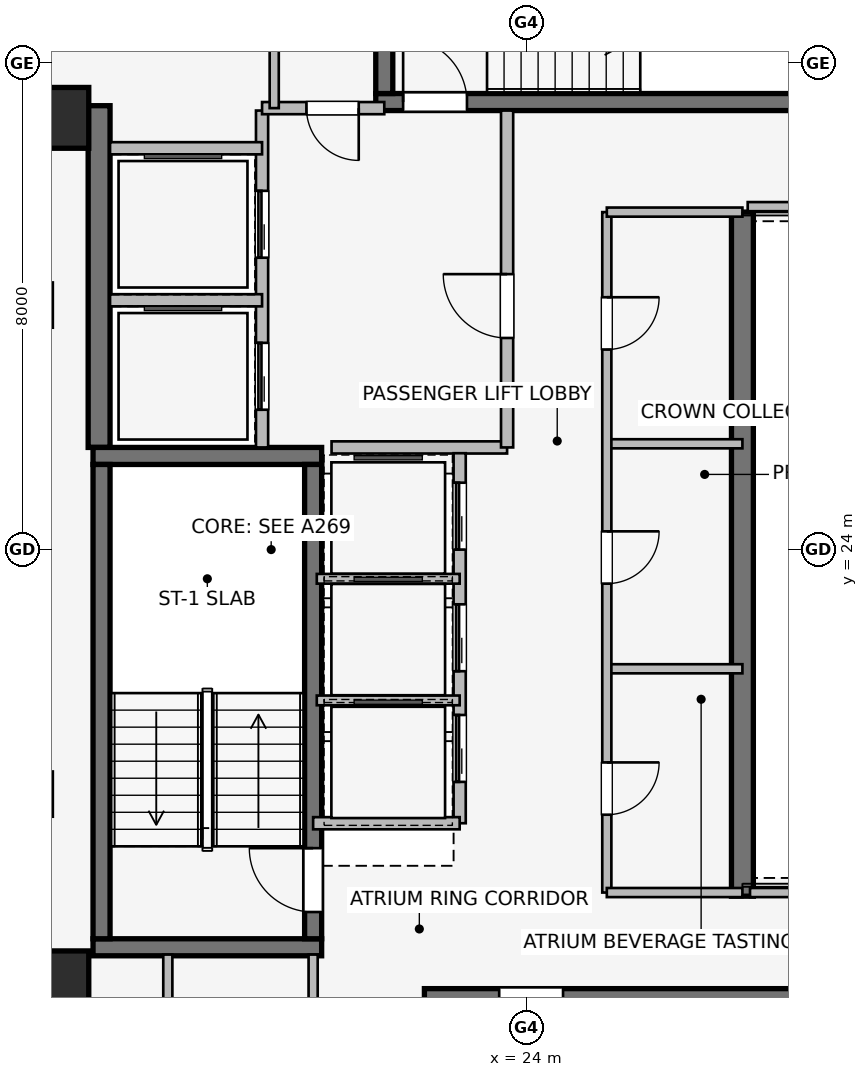
"""IFC4 building model, lengths in metres.
Left out: names, types, materials, properties, quantities, classifications, styles, units other than length and angle.
Written with IfcOpenShell. Run it as: python <this file> out.ifc"""

import sys

from ifc_helpers import new_model, si_unit, direction, frame, frame_2d, origin, origin_2d, place, context, subcontext, project, spatial, rectangle, extrude, element, fill, save


model = new_model("IFC4")
c1 = context("Model", 3, precision=1e-05, world=origin(), true_north=direction((0.0, 1.0)))
c2 = subcontext(c1, "Body", "Model", "MODEL_VIEW")
j1 = project(units=[si_unit("LENGTHUNIT", "METRE"), si_unit("PLANEANGLEUNIT", "RADIAN")], contexts=[c1])
p1 = place(None, origin())
s1 = spatial("IfcSite", under=j1, at=p1, CompositionType="ELEMENT")
p2 = place(p1, origin())
s2 = spatial("IfcBuilding", under=s1, at=p2, CompositionType="ELEMENT")
p3 = place(p2, frame((0.0, 0.0, 245.45)))
s3 = spatial("IfcBuildingStorey", under=s2, at=p3, CompositionType="ELEMENT", Elevation=245.45)
p4 = place(p3, frame((16.97, 25.68, 0.0), z_axis=(0.0, 0.0, 1.0), x_axis=(0.0, 1.0, 0.0)))
e1 = element("IfcWall", 1, at=p4, inside=s3, PredefinedType="SHEAR", context=c2, shape_type="SweptSolid", body=[
    extrude(rectangle(XDim=5.62, YDim=0.36, at=frame_2d((2.81, 0.0))), origin(), (0.0, 0.0, 1.0), 3.55),
])
p5 = place(p3, frame((27.55, 29.55, 0.0), z_axis=(0.0, 0.0, 1.0), x_axis=(0.0, -1.0, 0.0)))
e2 = element("IfcWall", 2, at=p5, inside=s3, PredefinedType="SHEAR", context=c2, shape_type="SweptSolid", body=[
    extrude(rectangle(XDim=11.25, YDim=0.36, at=frame_2d((5.625, 0.0))), origin(), (0.0, 0.0, 1.0), 3.55),
])
for number, where, z_axis, x_axis in (
    (3, (16.87, 17.46, 0.0), (0.0, 0.0, 1.0), (1.0, 0.0, 0.0)),
    (4, (20.63, 25.54, 0.0), (0.0, 0.0, 1.0), (-1.0, 0.0, 0.0)),
):
    element("IfcWall", number, at=place(p3, frame(where, z_axis=z_axis, x_axis=x_axis)), inside=s3, PredefinedType="SHEAR", context=c2, shape_type="SweptSolid", body=[
        extrude(rectangle(XDim=3.76, YDim=0.28, at=frame_2d((1.88, 0.0))), origin(), (0.0, 0.0, 1.0), 3.55),
    ])
p6 = place(p3, frame((17.01, 25.4, 0.0), z_axis=(0.0, 0.0, 1.0), x_axis=(0.0, -1.0, 0.0)))
e5 = element("IfcWall", 5, at=p6, inside=s3, PredefinedType="SHEAR", context=c2, shape_type="SweptSolid", body=[
    extrude(rectangle(XDim=7.8, YDim=0.28, at=frame_2d((3.9, 0.0))), origin(), (0.0, 0.0, 1.0), 3.55),
])
p7 = place(p3, frame((20.49, 17.6, 0.0), z_axis=(0.0, 0.0, 1.0), x_axis=(0.0, 1.0, 0.0)))
e6 = element("IfcWall", 6, at=p7, inside=s3, PredefinedType="SHEAR", context=c2, shape_type="SweptSolid", body=[
    extrude(rectangle(XDim=7.8, YDim=0.28, at=frame_2d((3.9, 0.0))), origin(), (0.0, 0.0, 1.0), 3.55),
])
p8 = place(p7, frame((0.44, 0.0, 0.0)))
e7 = element("IfcOpeningElement", 7, at=p8, cuts=e6, PredefinedType="OPENING", context=c2, shape_type="SweptSolid", body=[
    extrude(rectangle(XDim=1.05, YDim=2.0, at=frame_2d((0.525, 1.0))), frame((0.0, 0.15, 0.0), z_axis=(0.0, -1.0, 0.0), x_axis=(1.0, 0.0, 0.0)), (0.0, 0.0, 1.0), 0.3),
])
p9 = place(p3, frame((30.68, 16.64, 0.0), z_axis=(0.0, 0.0, 1.0), x_axis=(-1.0, 0.0, 0.0)))
e8 = element("IfcWall", 8, at=p9, inside=s3, PredefinedType="SHEAR", context=c2, shape_type="SweptSolid", body=[
    extrude(rectangle(XDim=8.36, YDim=0.28, at=frame_2d((4.18, 0.0))), origin(), (0.0, 0.0, 1.0), 3.55),
])
p10 = place(p9, frame((6.08, 0.0, 0.0)))
e9 = element("IfcOpeningElement", 9, at=p10, cuts=e8, PredefinedType="OPENING", context=c2, shape_type="SweptSolid", body=[
    extrude(rectangle(XDim=1.05, YDim=2.0, at=frame_2d((0.525, 1.0))), frame((0.0, 0.15, 0.0), z_axis=(0.0, -1.0, 0.0), x_axis=(1.0, 0.0, 0.0)), (0.0, 0.0, 1.0), 0.3),
])
p11 = place(p3, frame((21.52, 31.36, 0.0), z_axis=(0.0, 0.0, 1.0), x_axis=(1.0, 0.0, 0.0)))
e10 = element("IfcWall", 10, at=p11, inside=s3, PredefinedType="SHEAR", context=c2, shape_type="SweptSolid", body=[
    extrude(rectangle(XDim=8.36, YDim=0.28, at=frame_2d((4.18, 0.0))), origin(), (0.0, 0.0, 1.0), 3.55),
])
p12 = place(p11, frame((0.45, 0.0, 0.0)))
e11 = element("IfcOpeningElement", 11, at=p12, cuts=e10, PredefinedType="OPENING", context=c2, shape_type="SweptSolid", body=[
    extrude(rectangle(XDim=1.05, YDim=2.0, at=frame_2d((0.525, 1.0))), frame((0.0, 0.15, 0.0), z_axis=(0.0, -1.0, 0.0), x_axis=(1.0, 0.0, 0.0)), (0.0, 0.0, 1.0), 0.3),
])
p13 = place(p3, frame((21.66, 34.7, 0.0), z_axis=(0.0, 0.0, 1.0), x_axis=(0.0, -1.0, 0.0)))
e12 = element("IfcWall", 12, at=p13, inside=s3, PredefinedType="SHEAR", context=c2, shape_type="SweptSolid", body=[
    extrude(rectangle(XDim=3.2, YDim=0.28, at=frame_2d((1.6, 0.0))), origin(), (0.0, 0.0, 1.0), 3.55),
])
for number, where, z_axis, x_axis in (
    (13, (16.3, 16.9, 0.0), (0.0, 0.0, 1.0), (1.0, 0.0, 0.0)),
    (14, (16.3, 31.1, 0.0), (0.0, 0.0, 1.0), (1.0, 0.0, 0.0)),
):
    element("IfcColumn", number, at=place(p3, frame(where, z_axis=z_axis, x_axis=x_axis)), inside=s3, PredefinedType="COLUMN", context=c2, shape_type="SweptSolid", body=[
        extrude(rectangle(XDim=1.0, YDim=1.0, at=origin_2d()), origin(), (0.0, 0.0, 1.0), 3.55),
    ])
p14 = place(p3, frame((15.574, 32.082, 0.0), z_axis=(0.0, 0.0, 1.0), x_axis=(0.520325409202, 0.853968072318, 0.0)))
e15 = element("IfcWall", 15, at=p14, inside=s3, PredefinedType="STANDARD", context=c2, shape_type="SweptSolid", body=[
    extrude(rectangle(XDim=1.678, YDim=0.33, at=frame_2d((0.839, 0.0))), origin(), (0.0, 0.0, 1.0), 3.29),
])
p15 = place(p3, frame((19.65, 25.68, 0.0), z_axis=(0.0, 0.0, 1.0), x_axis=(0.0, 1.0, 0.0)))
e16 = element("IfcWall", 16, at=p15, inside=s3, PredefinedType="PARTITIONING", context=c2, shape_type="SweptSolid", body=[
    extrude(rectangle(XDim=5.54, YDim=0.2, at=frame_2d((2.77, 0.0))), origin(), (0.0, 0.0, 1.0), 3.29),
])
p16 = place(p15, frame((0.62, 0.0, 0.0)))
e17 = element("IfcOpeningElement", 17, at=p16, cuts=e16, PredefinedType="OPENING", context=c2, shape_type="SweptSolid", body=[
    extrude(rectangle(XDim=1.1, YDim=2.2, at=frame_2d((0.55, 1.1))), frame((0.0, 0.11, 0.0), z_axis=(0.0, -1.0, 0.0), x_axis=(1.0, 0.0, 0.0)), (0.0, 0.0, 1.0), 0.22),
])
p17 = place(p15, frame((3.12, 0.0, 0.0)))
e18 = element("IfcOpeningElement", 18, at=p17, cuts=e16, PredefinedType="OPENING", context=c2, shape_type="SweptSolid", body=[
    extrude(rectangle(XDim=1.1, YDim=2.2, at=frame_2d((0.55, 1.1))), frame((0.0, 0.11, 0.0), z_axis=(0.0, -1.0, 0.0), x_axis=(1.0, 0.0, 0.0)), (0.0, 0.0, 1.0), 0.22),
])
p18 = place(p3, frame((20.793, 25.68, 0.0), z_axis=(0.0, 0.0, 1.0), x_axis=(1.0, 0.0, 0.0)))
e19 = element("IfcWall", 19, at=p18, inside=s3, PredefinedType="PARTITIONING", context=c2, shape_type="SweptSolid", body=[
    extrude(rectangle(XDim=2.887, YDim=0.2, at=frame_2d((1.443, 0.0))), origin(), (0.0, 0.0, 1.0), 3.29),
])
p19 = place(p3, frame((23.68, 25.68, 0.0), z_axis=(0.0, 0.0, 1.0), x_axis=(0.0, 1.0, 0.0)))
e20 = element("IfcWall", 20, at=p19, inside=s3, PredefinedType="PARTITIONING", context=c2, shape_type="SweptSolid", body=[
    extrude(rectangle(XDim=5.54, YDim=0.2, at=frame_2d((2.77, 0.0))), origin(), (0.0, 0.0, 1.0), 3.29),
])
p20 = place(p19, frame((1.8, 0.0, 0.0)))
e21 = element("IfcOpeningElement", 21, at=p20, cuts=e20, PredefinedType="OPENING", context=c2, shape_type="SweptSolid", body=[
    extrude(rectangle(XDim=1.05, YDim=2.0, at=frame_2d((0.525, 1.0))), frame((0.0, 0.11, 0.0), z_axis=(0.0, -1.0, 0.0), x_axis=(1.0, 0.0, 0.0)), (0.0, 0.0, 1.0), 0.22),
])
p21 = place(p3, frame((21.66, 31.26, 0.0), z_axis=(0.0, 0.0, 1.0), x_axis=(-1.0, 0.0, 0.0)))
e22 = element("IfcWall", 22, at=p21, inside=s3, PredefinedType="PARTITIONING", context=c2, shape_type="SweptSolid", body=[
    extrude(rectangle(XDim=2.01, YDim=0.2, at=frame_2d((1.005, 0.0))), origin(), (0.0, 0.0, 1.0), 3.29),
])
p22 = place(p21, frame((0.42, 0.0, 0.0)))
e23 = element("IfcOpeningElement", 23, at=p22, cuts=e22, PredefinedType="OPENING", context=c2, shape_type="SweptSolid", body=[
    extrude(rectangle(XDim=0.86, YDim=2.0, at=frame_2d((0.43, 1.0))), frame((0.0, 0.11, 0.0), z_axis=(0.0, -1.0, 0.0), x_axis=(1.0, 0.0, 0.0)), (0.0, 0.0, 1.0), 0.22),
])
p23 = place(p3, frame((17.15, 28.1, 0.0), z_axis=(0.0, 0.0, 1.0), x_axis=(1.0, 0.0, 0.0)))
e24 = element("IfcWall", 24, at=p23, inside=s3, PredefinedType="PARTITIONING", context=c2, shape_type="SweptSolid", body=[
    extrude(rectangle(XDim=2.5, YDim=0.2, at=frame_2d((1.25, 0.0))), origin(), (0.0, 0.0, 1.0), 3.29),
])
p24 = place(p3, frame((19.65, 30.6, 0.0), z_axis=(0.0, 0.0, 1.0), x_axis=(-1.0, 0.0, 0.0)))
e25 = element("IfcWall", 25, at=p24, inside=s3, PredefinedType="PARTITIONING", context=c2, shape_type="SweptSolid", body=[
    extrude(rectangle(XDim=2.5, YDim=0.2, at=frame_2d((1.25, 0.0))), origin(), (0.0, 0.0, 1.0), 2.19),
])
p25 = place(p3, frame((22.9, 19.5, 0.0), z_axis=(0.0, 0.0, 1.0), x_axis=(0.0, 1.0, 0.0)))
e26 = element("IfcWall", 26, at=p25, inside=s3, PredefinedType="PARTITIONING", context=c2, shape_type="SweptSolid", body=[
    extrude(rectangle(XDim=6.085, YDim=0.2, at=frame_2d((3.042, 0.0))), origin(), (0.0, 0.0, 1.0), 3.29),
])
p26 = place(p25, frame((0.68, 0.0, 0.0)))
e27 = element("IfcOpeningElement", 27, at=p26, cuts=e26, PredefinedType="OPENING", context=c2, shape_type="SweptSolid", body=[
    extrude(rectangle(XDim=1.1, YDim=2.2, at=frame_2d((0.55, 1.1))), frame((0.0, 0.11, 0.0), z_axis=(0.0, -1.0, 0.0), x_axis=(1.0, 0.0, 0.0)), (0.0, 0.0, 1.0), 0.22),
])
p27 = place(p25, frame((2.5, 0.0, 0.0)))
e28 = element("IfcOpeningElement", 28, at=p27, cuts=e26, PredefinedType="OPENING", context=c2, shape_type="SweptSolid", body=[
    extrude(rectangle(XDim=1.1, YDim=2.2, at=frame_2d((0.55, 1.1))), frame((0.0, 0.11, 0.0), z_axis=(0.0, -1.0, 0.0), x_axis=(1.0, 0.0, 0.0)), (0.0, 0.0, 1.0), 0.22),
])
p28 = place(p25, frame((4.5, 0.0, 0.0)))
e29 = element("IfcOpeningElement", 29, at=p28, cuts=e26, PredefinedType="OPENING", context=c2, shape_type="SweptSolid", body=[
    extrude(rectangle(XDim=1.1, YDim=2.2, at=frame_2d((0.55, 1.1))), frame((0.0, 0.11, 0.0), z_axis=(0.0, -1.0, 0.0), x_axis=(1.0, 0.0, 0.0)), (0.0, 0.0, 1.0), 0.22),
])
p29 = place(p3, frame((20.49, 19.5, 0.0), z_axis=(0.0, 0.0, 1.0), x_axis=(1.0, 0.0, 0.0)))
e30 = element("IfcWall", 30, at=p29, inside=s3, PredefinedType="PARTITIONING", context=c2, shape_type="SweptSolid", body=[
    extrude(rectangle(XDim=2.41, YDim=0.2, at=frame_2d((1.205, 0.0))), origin(), (0.0, 0.0, 1.0), 2.19),
])
for number, where, z_axis, x_axis in (
    (31, (20.55, 21.52, 0.0), (0.0, 0.0, 1.0), (1.0, 0.0, 0.0)),
    (32, (20.55, 23.52, 0.0), (0.0, 0.0, 1.0), (1.0, 0.0, 0.0)),
):
    element("IfcWall", number, at=place(p3, frame(where, z_axis=z_axis, x_axis=x_axis)), inside=s3, PredefinedType="PARTITIONING", context=c2, shape_type="SweptSolid", body=[
        extrude(rectangle(XDim=2.35, YDim=0.16, at=frame_2d((1.175, 0.0))), origin(), (0.0, 0.0, 1.0), 3.29),
    ])
for number, where, z_axis, x_axis in (
    (33, (25.32, 22.04, 0.0), (0.0, 0.0, 1.0), (1.0, 0.0, 0.0)),
    (34, (25.32, 25.74, 0.0), (0.0, 0.0, 1.0), (1.0, 0.0, 0.0)),
):
    element("IfcWall", number, at=place(p3, frame(where, z_axis=z_axis, x_axis=x_axis)), inside=s3, PredefinedType="PARTITIONING", context=c2, shape_type="SweptSolid", body=[
        extrude(rectangle(XDim=2.23, YDim=0.15, at=frame_2d((1.115, 0.0))), origin(), (0.0, 0.0, 1.0), 3.29),
    ])
p30 = place(p3, frame((25.32, 29.55, 0.0), z_axis=(0.0, 0.0, 1.0), x_axis=(0.0, -1.0, 0.0)))
e35 = element("IfcWall", 35, at=p30, inside=s3, PredefinedType="PARTITIONING", context=c2, shape_type="SweptSolid", body=[
    extrude(rectangle(XDim=11.19, YDim=0.15, at=frame_2d((5.595, 0.0))), origin(), (0.0, 0.0, 1.0), 3.29),
])
p31 = place(p30, frame((1.4, 0.0, 0.0)))
e36 = element("IfcOpeningElement", 36, at=p31, cuts=e35, PredefinedType="OPENING", context=c2, shape_type="SweptSolid", body=[
    extrude(rectangle(XDim=0.86, YDim=2.0, at=frame_2d((0.43, 1.0))), frame((0.0, 0.085, 0.0), z_axis=(0.0, -1.0, 0.0), x_axis=(1.0, 0.0, 0.0)), (0.0, 0.0, 1.0), 0.17),
])
p32 = place(p30, frame((5.25, 0.0, 0.0)))
e37 = element("IfcOpeningElement", 37, at=p32, cuts=e35, PredefinedType="OPENING", context=c2, shape_type="SweptSolid", body=[
    extrude(rectangle(XDim=0.86, YDim=2.0, at=frame_2d((0.43, 1.0))), frame((0.0, 0.085, 0.0), z_axis=(0.0, -1.0, 0.0), x_axis=(1.0, 0.0, 0.0)), (0.0, 0.0, 1.0), 0.17),
])
p33 = place(p30, frame((9.05, 0.0, 0.0)))
e38 = element("IfcOpeningElement", 38, at=p33, cuts=e35, PredefinedType="OPENING", context=c2, shape_type="SweptSolid", body=[
    extrude(rectangle(XDim=0.86, YDim=2.0, at=frame_2d((0.43, 1.0))), frame((0.0, 0.085, 0.0), z_axis=(0.0, -1.0, 0.0), x_axis=(1.0, 0.0, 0.0)), (0.0, 0.0, 1.0), 0.17),
])
p34 = place(p3, frame((25.32, 18.36, 0.0), z_axis=(0.0, 0.0, 1.0), x_axis=(1.0, 0.0, 0.0)))
e39 = element("IfcWall", 39, at=p34, inside=s3, PredefinedType="PARTITIONING", context=c2, shape_type="SweptSolid", body=[
    extrude(rectangle(XDim=2.23, YDim=0.15, at=frame_2d((1.115, 0.0))), origin(), (0.0, 0.0, 1.0), 3.29),
])
p35 = place(p3, frame((27.55, 29.55, 0.0), z_axis=(0.0, 0.0, 1.0), x_axis=(-1.0, 0.0, 0.0)))
e40 = element("IfcWall", 40, at=p35, inside=s3, PredefinedType="PARTITIONING", context=c2, shape_type="SweptSolid", body=[
    extrude(rectangle(XDim=2.23, YDim=0.15, at=frame_2d((1.115, 0.0))), origin(), (0.0, 0.0, 1.0), 2.19),
])
p36 = place(p3, frame((18.1, 17.34, 0.0), z_axis=(0.0, 0.0, 1.0), x_axis=(0.0, -1.0, 0.0)))
e41 = element("IfcWall", 41, at=p36, inside=s3, PredefinedType="PARTITIONING", context=c2, shape_type="SweptSolid", body=[
    extrude(rectangle(XDim=2.52, YDim=0.15, at=frame_2d((1.26, 0.0))), origin(), (0.0, 0.0, 1.0), 3.29),
])
p37 = place(p3, frame((20.49, 14.82, 0.0), z_axis=(0.0, 0.0, 1.0), x_axis=(0.0, 1.0, 0.0)))
e42 = element("IfcWall", 42, at=p37, inside=s3, PredefinedType="PARTITIONING", context=c2, shape_type="SweptSolid", body=[
    extrude(rectangle(XDim=2.52, YDim=0.15, at=frame_2d((1.26, 0.0))), origin(), (0.0, 0.0, 1.0), 3.29),
])
p38 = place(p37, frame((0.72, 0.0, 0.0)))
e43 = element("IfcOpeningElement", 43, at=p38, cuts=e42, PredefinedType="OPENING", context=c2, shape_type="SweptSolid", body=[
    extrude(rectangle(XDim=0.86, YDim=2.0, at=frame_2d((0.43, 1.0))), frame((0.0, 0.085, 0.0), z_axis=(0.0, -1.0, 0.0), x_axis=(1.0, 0.0, 0.0)), (0.0, 0.0, 1.0), 0.17),
])
p39 = place(p3, frame((19.85, 33.45, 0.0), z_axis=(0.0, 0.0, 1.0), x_axis=(0.0, -1.0, 0.0)))
e44 = element("IfcWall", 44, at=p39, inside=s3, PredefinedType="PARTITIONING", context=c2, shape_type="SweptSolid", body=[
    extrude(rectangle(XDim=2.19, YDim=0.15, at=frame_2d((1.095, 0.0))), origin(), (0.0, 0.0, 1.0), 3.29),
])
p40 = place(p3, frame((27.675, 18.36, 0.0), z_axis=(0.0, 0.0, 1.0), x_axis=(1.0, 0.0, 0.0)))
e45 = element("IfcWall", 45, at=p40, inside=s3, PredefinedType="PARTITIONING", context=c2, shape_type="SweptSolid", body=[
    extrude(rectangle(XDim=12.165, YDim=0.15, at=frame_2d((6.083, 0.0))), origin(), (0.0, 0.0, 1.0), 2.431),
])
p41 = place(p3, frame((39.84, 29.64, 0.0), z_axis=(0.0, 0.0, 1.0), x_axis=(-1.0, 0.0, 0.0)))
e46 = element("IfcWall", 46, at=p41, inside=s3, PredefinedType="PARTITIONING", context=c2, shape_type="SweptSolid", body=[
    extrude(rectangle(XDim=12.203, YDim=0.15, at=frame_2d((6.102, 0.0))), origin(), (0.0, 0.0, 1.0), 2.431),
])
p42 = place(p8, origin())
e47 = element("IfcDoor", 47, at=p42, inside=s3, OperationType="SINGLE_SWING_RIGHT", PredefinedType="DOOR", context=c2, shape_type="SweptSolid", body=[
    extrude(rectangle(XDim=1.05, YDim=2.0, at=frame_2d((0.525, 1.0))), frame((0.0, 0.025, 0.0), z_axis=(0.0, -1.0, 0.0), x_axis=(1.0, 0.0, 0.0)), (0.0, 0.0, 1.0), 0.05),
])
fill(e7, e47)
p43 = place(p10, origin())
e48 = element("IfcDoor", 48, at=p43, inside=s3, OperationType="SINGLE_SWING_RIGHT", PredefinedType="DOOR", context=c2, shape_type="SweptSolid", body=[
    extrude(rectangle(XDim=1.05, YDim=2.0, at=frame_2d((0.525, 1.0))), frame((0.0, 0.025, 0.0), z_axis=(0.0, -1.0, 0.0), x_axis=(1.0, 0.0, 0.0)), (0.0, 0.0, 1.0), 0.05),
])
fill(e9, e48)
p44 = place(p12, origin())
e49 = element("IfcDoor", 49, at=p44, inside=s3, OperationType="SINGLE_SWING_LEFT", PredefinedType="DOOR", context=c2, shape_type="SweptSolid", body=[
    extrude(rectangle(XDim=1.05, YDim=2.0, at=frame_2d((0.525, 1.0))), frame((0.0, 0.025, 0.0), z_axis=(0.0, -1.0, 0.0), x_axis=(1.0, 0.0, 0.0)), (0.0, 0.0, 1.0), 0.05),
])
fill(e11, e49)
p45 = place(p16, origin())
e50 = element("IfcDoor", 50, at=p45, inside=s3, OperationType="SLIDING_TO_LEFT", PredefinedType="DOOR", context=c2, shape_type="SweptSolid", body=[
    extrude(rectangle(XDim=1.1, YDim=2.2, at=frame_2d((0.55, 1.1))), frame((0.0, 0.025, 0.0), z_axis=(0.0, -1.0, 0.0), x_axis=(1.0, 0.0, 0.0)), (0.0, 0.0, 1.0), 0.05),
])
fill(e17, e50)
p46 = place(p17, origin())
e51 = element("IfcDoor", 51, at=p46, inside=s3, OperationType="SLIDING_TO_LEFT", PredefinedType="DOOR", context=c2, shape_type="SweptSolid", body=[
    extrude(rectangle(XDim=1.1, YDim=2.2, at=frame_2d((0.55, 1.1))), frame((0.0, 0.025, 0.0), z_axis=(0.0, -1.0, 0.0), x_axis=(1.0, 0.0, 0.0)), (0.0, 0.0, 1.0), 0.05),
])
fill(e18, e51)
p47 = place(p20, origin())
e52 = element("IfcDoor", 52, at=p47, inside=s3, OperationType="SINGLE_SWING_RIGHT", PredefinedType="DOOR", context=c2, shape_type="SweptSolid", body=[
    extrude(rectangle(XDim=1.05, YDim=2.0, at=frame_2d((0.525, 1.0))), frame((0.0, 0.025, 0.0), z_axis=(0.0, -1.0, 0.0), x_axis=(1.0, 0.0, 0.0)), (0.0, 0.0, 1.0), 0.05),
])
fill(e21, e52)
p48 = place(p22, origin())
e53 = element("IfcDoor", 53, at=p48, inside=s3, OperationType="SINGLE_SWING_LEFT", PredefinedType="DOOR", context=c2, shape_type="SweptSolid", body=[
    extrude(rectangle(XDim=0.86, YDim=2.0, at=frame_2d((0.43, 1.0))), frame((0.0, 0.025, 0.0), z_axis=(0.0, -1.0, 0.0), x_axis=(1.0, 0.0, 0.0)), (0.0, 0.0, 1.0), 0.05),
])
fill(e23, e53)
p49 = place(p26, origin())
e54 = element("IfcDoor", 54, at=p49, inside=s3, OperationType="SLIDING_TO_LEFT", PredefinedType="DOOR", context=c2, shape_type="SweptSolid", body=[
    extrude(rectangle(XDim=1.1, YDim=2.2, at=frame_2d((0.55, 1.1))), frame((0.0, 0.025, 0.0), z_axis=(0.0, -1.0, 0.0), x_axis=(1.0, 0.0, 0.0)), (0.0, 0.0, 1.0), 0.05),
])
fill(e27, e54)
p50 = place(p27, origin())
e55 = element("IfcDoor", 55, at=p50, inside=s3, OperationType="SLIDING_TO_LEFT", PredefinedType="DOOR", context=c2, shape_type="SweptSolid", body=[
    extrude(rectangle(XDim=1.1, YDim=2.2, at=frame_2d((0.55, 1.1))), frame((0.0, 0.025, 0.0), z_axis=(0.0, -1.0, 0.0), x_axis=(1.0, 0.0, 0.0)), (0.0, 0.0, 1.0), 0.05),
])
fill(e28, e55)
p51 = place(p28, origin())
e56 = element("IfcDoor", 56, at=p51, inside=s3, OperationType="SLIDING_TO_LEFT", PredefinedType="DOOR", context=c2, shape_type="SweptSolid", body=[
    extrude(rectangle(XDim=1.1, YDim=2.2, at=frame_2d((0.55, 1.1))), frame((0.0, 0.025, 0.0), z_axis=(0.0, -1.0, 0.0), x_axis=(1.0, 0.0, 0.0)), (0.0, 0.0, 1.0), 0.05),
])
fill(e29, e56)
p52 = place(p31, origin())
e57 = element("IfcDoor", 57, at=p52, inside=s3, OperationType="SINGLE_SWING_LEFT", PredefinedType="DOOR", context=c2, shape_type="SweptSolid", body=[
    extrude(rectangle(XDim=0.86, YDim=2.0, at=frame_2d((0.43, 1.0))), frame((0.0, 0.025, 0.0), z_axis=(0.0, -1.0, 0.0), x_axis=(1.0, 0.0, 0.0)), (0.0, 0.0, 1.0), 0.05),
])
fill(e36, e57)
p53 = place(p32, origin())
e58 = element("IfcDoor", 58, at=p53, inside=s3, OperationType="SINGLE_SWING_LEFT", PredefinedType="DOOR", context=c2, shape_type="SweptSolid", body=[
    extrude(rectangle(XDim=0.86, YDim=2.0, at=frame_2d((0.43, 1.0))), frame((0.0, 0.025, 0.0), z_axis=(0.0, -1.0, 0.0), x_axis=(1.0, 0.0, 0.0)), (0.0, 0.0, 1.0), 0.05),
])
fill(e37, e58)
p54 = place(p33, origin())
e59 = element("IfcDoor", 59, at=p54, inside=s3, OperationType="SINGLE_SWING_LEFT", PredefinedType="DOOR", context=c2, shape_type="SweptSolid", body=[
    extrude(rectangle(XDim=0.86, YDim=2.0, at=frame_2d((0.43, 1.0))), frame((0.0, 0.025, 0.0), z_axis=(0.0, -1.0, 0.0), x_axis=(1.0, 0.0, 0.0)), (0.0, 0.0, 1.0), 0.05),
])
fill(e38, e59)
save(model, sys.argv[1])
